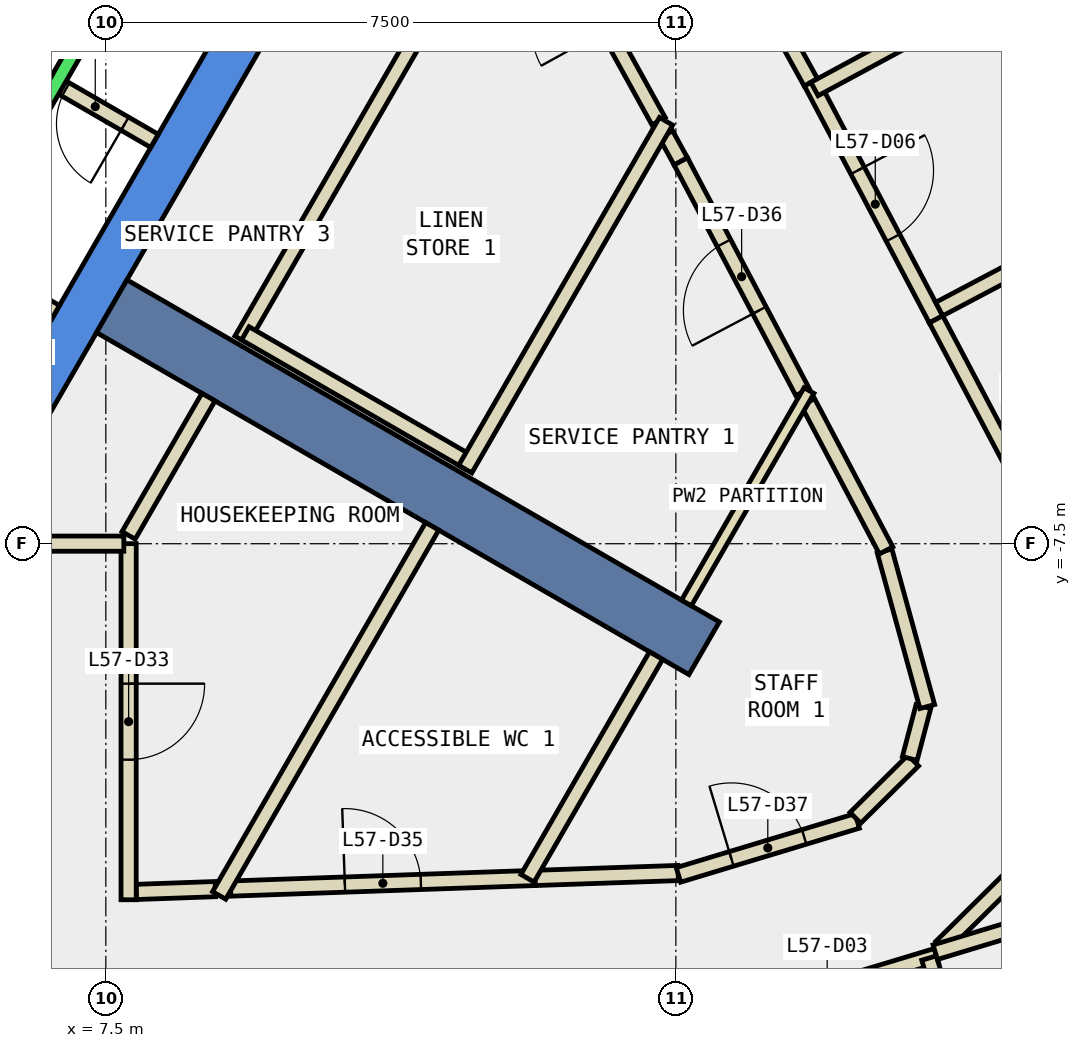
"""IFC4 building model, lengths in metres.
Left out: names, types, materials, properties, quantities, classifications, styles, units other than length and angle.
Written with IfcOpenShell. Run it as: python <this file> out.ifc"""

import sys

from ifc_helpers import new_model, si_unit, direction, frame, frame_2d, origin, place, context, subcontext, project, spatial, polyline, rectangle, outline, extrude, element, fill, save


model = new_model("IFC4")
c1 = context("Model", 3, precision=1e-05, world=origin(), true_north=direction((0.0, 1.0)))
c2 = subcontext(c1, "Body", "Model", "MODEL_VIEW")
j1 = project(units=[si_unit("LENGTHUNIT", "METRE"), si_unit("PLANEANGLEUNIT", "RADIAN")], contexts=[c1])
p1 = place(None, origin())
s1 = spatial("IfcSite", under=j1, at=p1, CompositionType="ELEMENT")
p2 = place(p1, origin())
s2 = spatial("IfcBuilding", under=s1, at=p2, CompositionType="ELEMENT")
p3 = place(p2, frame((0.0, 0.0, 252.2)))
s3 = spatial("IfcBuildingStorey", under=s2, at=p3, CompositionType="ELEMENT", Elevation=252.2)
p4 = place(p3, frame((0.0, 0.0, -0.34)))
e1 = element("IfcWall", 1, at=p4, inside=s3, PredefinedType="SHEAR", context=c2, shape_type="SweptSolid", body=[
    extrude(outline(polyline([(5.774, -7.5), (11.547, 2.5), (10.854, 2.5), (5.427, -6.9), (5.774, -7.5)])), origin(), (0.0, 0.0, 1.0), 3.6),
])
p5 = place(p3, frame((7.578, -4.375, -0.34), z_axis=(0.0, 0.0, 1.0), x_axis=(0.866024315419, -0.5000018851, 0.0)))
e2 = element("IfcWall", 2, at=p5, inside=s3, PredefinedType="SHEAR", context=c2, shape_type="SweptSolid", body=[
    extrude(rectangle(XDim=9.0, YDim=0.8, at=frame_2d((4.5, 0.0))), origin(), (0.0, 0.0, 1.0), 3.6),
])
p6 = place(p3, frame((7.9, -12.081, 0.0), z_axis=(0.0, 0.0, 1.0), x_axis=(0.999365240621, 0.035624652105, 0.0)))
e3 = element("IfcWall", 3, at=p6, inside=s3, PredefinedType="PARTITIONING", context=c2, shape_type="SweptSolid", body=[
    extrude(rectangle(XDim=1.042, YDim=0.2, at=frame_2d((0.521, 0.0))), origin(), (0.0, 0.0, 1.0), 3.26),
])
p7 = place(p3, frame((14.773, -1.941, 0.0), z_axis=(0.0, 0.0, 1.0), x_axis=(-0.483431586589, 0.875382145744, 0.0)))
e4 = element("IfcWall", 4, at=p7, inside=s3, PredefinedType="PARTITIONING", context=c2, shape_type="SweptSolid", body=[
    extrude(rectangle(XDim=3.771, YDim=0.2, at=frame_2d((1.885, 0.0))), origin(), (0.0, 0.0, 1.0), 3.26),
])
p8 = place(p7, frame((1.385, 0.0, 0.0)))
e5 = element("IfcOpeningElement", 5, at=p8, cuts=e4, PredefinedType="OPENING", context=c2, shape_type="SweptSolid", body=[
    extrude(rectangle(XDim=1.0, YDim=2.1, at=frame_2d((0.5, 1.05))), frame((0.0, 0.11, 0.0), z_axis=(0.0, -1.0, 0.0), x_axis=(1.0, 0.0, 0.0)), (0.0, 0.0, 1.0), 0.22),
])
p9 = place(p3, frame((9.141, -12.037, 0.0), z_axis=(0.0, 0.0, 1.0), x_axis=(0.999388955878, 0.034953038062, 0.0)))
e6 = element("IfcWall", 6, at=p9, inside=s3, PredefinedType="PARTITIONING", context=c2, shape_type="SweptSolid", body=[
    extrude(rectangle(XDim=4.009, YDim=0.2, at=frame_2d((2.005, 0.0))), origin(), (0.0, 0.0, 1.0), 3.26),
])
p10 = place(p9, frame((1.505, 0.0, 0.0)))
e7 = element("IfcOpeningElement", 7, at=p10, cuts=e6, PredefinedType="OPENING", context=c2, shape_type="SweptSolid", body=[
    extrude(rectangle(XDim=1.0, YDim=2.1, at=frame_2d((0.5, 1.05))), frame((0.0, 0.11, 0.0), z_axis=(0.0, -1.0, 0.0), x_axis=(1.0, 0.0, 0.0)), (0.0, 0.0, 1.0), 0.22),
])
p11 = place(p3, frame((16.667, -5.505, 0.0), z_axis=(0.0, 0.0, 1.0), x_axis=(-0.466812680399, 0.884356218624, 0.0)))
e8 = element("IfcWall", 8, at=p11, inside=s3, PredefinedType="PARTITIONING", context=c2, shape_type="SweptSolid", body=[
    extrude(rectangle(XDim=3.434, YDim=0.2, at=frame_2d((1.717, 0.0))), origin(), (0.0, 0.0, 1.0), 3.26),
])
p12 = place(p11, frame((1.217, 0.0, 0.0)))
e9 = element("IfcOpeningElement", 9, at=p12, cuts=e8, PredefinedType="OPENING", context=c2, shape_type="SweptSolid", body=[
    extrude(rectangle(XDim=1.0, YDim=2.1, at=frame_2d((0.5, 1.05))), frame((0.0, 0.11, 0.0), z_axis=(0.0, -1.0, 0.0), x_axis=(1.0, 0.0, 0.0)), (0.0, 0.0, 1.0), 0.22),
])
p13 = place(p3, frame((15.064, -2.468, 0.0), z_axis=(0.0, 0.0, 1.0), x_axis=(-0.482338449744, 0.875984942735, 0.0)))
e10 = element("IfcWall", 10, at=p13, inside=s3, PredefinedType="PARTITIONING", context=c2, shape_type="SweptSolid", body=[
    extrude(rectangle(XDim=0.402, YDim=0.2, at=frame_2d((0.201, 0.0))), origin(), (0.0, 0.0, 1.0), 3.26),
])
p14 = place(p3, frame((13.148, -11.897, 0.0), z_axis=(0.0, 0.0, 1.0), x_axis=(0.999405229262, 0.034484601243, 0.0)))
e11 = element("IfcWall", 11, at=p14, inside=s3, PredefinedType="PARTITIONING", context=c2, shape_type="SweptSolid", body=[
    extrude(rectangle(XDim=1.883, YDim=0.2, at=frame_2d((0.942, 0.0))), origin(), (0.0, 0.0, 1.0), 3.26),
])
p15 = place(p3, frame((15.034, -11.857, 0.0), z_axis=(0.0, 0.0, 1.0), x_axis=(0.957338084933, 0.288970225346, 0.0)))
e12 = element("IfcWall", 12, at=p15, inside=s3, PredefinedType="PARTITIONING", context=c2, shape_type="SweptSolid", body=[
    extrude(rectangle(XDim=2.457, YDim=0.2, at=frame_2d((1.229, 0.0))), origin(), (0.0, 0.0, 1.0), 3.26),
])
p16 = place(p15, frame((0.728, 0.0, 0.0)))
e13 = element("IfcOpeningElement", 13, at=p16, cuts=e12, PredefinedType="OPENING", context=c2, shape_type="SweptSolid", body=[
    extrude(rectangle(XDim=1.0, YDim=2.1, at=frame_2d((0.5, 1.05))), frame((0.0, 0.11, 0.0), z_axis=(0.0, -1.0, 0.0), x_axis=(1.0, 0.0, 0.0)), (0.0, 0.0, 1.0), 0.22),
])
p17 = place(p3, frame((17.362, -11.106, 0.0), z_axis=(0.0, 0.0, 1.0), x_axis=(0.710859741153, 0.703333795866, 0.0)))
e14 = element("IfcWall", 14, at=p17, inside=s3, PredefinedType="PARTITIONING", context=c2, shape_type="SweptSolid", body=[
    extrude(rectangle(XDim=1.071, YDim=0.2, at=frame_2d((0.535, 0.0))), origin(), (0.0, 0.0, 1.0), 3.26),
])
p18 = place(p3, frame((18.077, -10.326, 0.0), z_axis=(0.0, 0.0, 1.0), x_axis=(0.254782174857, 0.966998471237, 0.0)))
e15 = element("IfcWall", 15, at=p18, inside=s3, PredefinedType="PARTITIONING", context=c2, shape_type="SweptSolid", body=[
    extrude(rectangle(XDim=0.707, YDim=0.2, at=frame_2d((0.354, 0.0))), origin(), (0.0, 0.0, 1.0), 3.26),
])
p19 = place(p3, frame((18.308, -9.642, 0.0), z_axis=(0.0, 0.0, 1.0), x_axis=(-0.264859637197, 0.96428697626, 0.0)))
e16 = element("IfcWall", 16, at=p19, inside=s3, PredefinedType="PARTITIONING", context=c2, shape_type="SweptSolid", body=[
    extrude(rectangle(XDim=2.122, YDim=0.2, at=frame_2d((1.061, 0.0))), origin(), (0.0, 0.0, 1.0), 3.26),
])
p20 = place(p3, frame((17.766, -7.588, 0.0), z_axis=(0.0, 0.0, 1.0), x_axis=(-0.466727344864, 0.884401258228, 0.0)))
e17 = element("IfcWall", 17, at=p20, inside=s3, PredefinedType="PARTITIONING", context=c2, shape_type="SweptSolid", body=[
    extrude(rectangle(XDim=2.205, YDim=0.2, at=frame_2d((1.103, 0.0))), origin(), (0.0, 0.0, 1.0), 3.26),
])
p21 = place(p3, frame((18.427, -12.922, 0.0), z_axis=(0.0, 0.0, 1.0), x_axis=(-0.957336631432, -0.288975040651, 0.0)))
e18 = element("IfcWall", 18, at=p21, inside=s3, PredefinedType="PARTITIONING", context=c2, shape_type="SweptSolid", body=[
    extrude(rectangle(XDim=3.0, YDim=0.2, at=frame_2d((1.5, 0.0))), origin(), (0.0, 0.0, 1.0), 3.26),
])
p22 = place(p21, frame((1.0, 0.0, 0.0)))
e19 = element("IfcOpeningElement", 19, at=p22, cuts=e18, PredefinedType="OPENING", context=c2, shape_type="SweptSolid", body=[
    extrude(rectangle(XDim=1.0, YDim=2.1, at=frame_2d((0.5, 1.05))), frame((0.0, 0.11, 0.0), z_axis=(0.0, -1.0, 0.0), x_axis=(1.0, 0.0, 0.0)), (0.0, 0.0, 1.0), 0.22),
])
p23 = place(p3, frame((19.919, -11.39, 0.0), z_axis=(0.0, 0.0, 1.0), x_axis=(-0.71104667794, -0.70314480855, 0.0)))
e20 = element("IfcWall", 20, at=p23, inside=s3, PredefinedType="PARTITIONING", context=c2, shape_type="SweptSolid", body=[
    extrude(rectangle(XDim=2.008, YDim=0.2, at=frame_2d((1.004, 0.0))), origin(), (0.0, 0.0, 1.0), 3.26),
])
p24 = place(p3, frame((16.778, -1.429, 0.0), z_axis=(0.0, 0.0, 1.0), x_axis=(0.466493865945, -0.884524433261, 0.0)))
e21 = element("IfcWall", 21, at=p24, inside=s3, PredefinedType="PARTITIONING", context=c2, shape_type="SweptSolid", body=[
    extrude(rectangle(XDim=3.526, YDim=0.2, at=frame_2d((1.763, 0.0))), origin(), (0.0, 0.0, 1.0), 3.26),
])
p25 = place(p24, frame((1.313, 0.0, 0.0)))
e22 = element("IfcOpeningElement", 22, at=p25, cuts=e21, PredefinedType="OPENING", context=c2, shape_type="SweptSolid", body=[
    extrude(rectangle(XDim=1.0, YDim=2.1, at=frame_2d((0.5, 1.05))), frame((0.0, 0.11, 0.0), z_axis=(0.0, -1.0, 0.0), x_axis=(1.0, 0.0, 0.0)), (0.0, 0.0, 1.0), 0.22),
])
p26 = place(p3, frame((18.423, -4.548, 0.0), z_axis=(0.0, 0.0, 1.0), x_axis=(0.466792565793, -0.884366835946, 0.0)))
e23 = element("IfcWall", 23, at=p26, inside=s3, PredefinedType="PARTITIONING", context=c2, shape_type="SweptSolid", body=[
    extrude(rectangle(XDim=2.5, YDim=0.2, at=frame_2d((1.25, 0.0))), origin(), (0.0, 0.0, 1.0), 3.26),
])
p27 = place(p3, frame((15.715, 0.491, 0.0), z_axis=(0.0, 0.0, 1.0), x_axis=(0.483421428323, -0.875387755591, 0.0)))
e24 = element("IfcWall", 24, at=p27, inside=s3, PredefinedType="PARTITIONING", context=c2, shape_type="SweptSolid", body=[
    extrude(rectangle(XDim=2.194, YDim=0.2, at=frame_2d((1.097, 0.0))), origin(), (0.0, 0.0, 1.0), 3.26),
])
p28 = place(p3, frame((5.888, -3.902, 0.0), z_axis=(0.0, 0.0, 1.0), x_axis=(0.86621513555, -0.499671230855, 0.0)))
e25 = element("IfcWall", 25, at=p28, inside=s3, PredefinedType="PARTITIONING", context=c2, shape_type="SweptSolid", body=[
    extrude(rectangle(XDim=1.1, YDim=0.2, at=frame_2d((0.55, 0.0))), origin(), (0.0, 0.0, 1.0), 3.26),
])
p29 = place(p3, frame((8.14, -2.2, 0.0), z_axis=(0.0, 0.0, 1.0), x_axis=(-0.865545166185, 0.500830874941, 0.0)))
e26 = element("IfcWall", 26, at=p29, inside=s3, PredefinedType="PARTITIONING", context=c2, shape_type="SweptSolid", body=[
    extrude(rectangle(XDim=1.5, YDim=0.2, at=frame_2d((0.75, 0.0))), origin(), (0.0, 0.0, 1.0), 3.26),
])
p30 = place(p29, frame((0.45, 0.0, 0.0)))
e27 = element("IfcOpeningElement", 27, at=p30, cuts=e26, PredefinedType="OPENING", context=c2, shape_type="SweptSolid", body=[
    extrude(rectangle(XDim=0.9, YDim=2.1, at=frame_2d((0.45, 1.05))), frame((0.0, 0.11, 0.0), z_axis=(0.0, -1.0, 0.0), x_axis=(1.0, 0.0, 0.0)), (0.0, 0.0, 1.0), 0.22),
])
p31 = place(p3, frame((7.8, -7.39, 0.0), z_axis=(0.0, 0.0, 1.0), x_axis=(0.499977374825, 0.866038466041, 0.0)))
e28 = element("IfcWall", 28, at=p31, inside=s3, PredefinedType="PARTITIONING", context=c2, shape_type="SweptSolid", body=[
    extrude(rectangle(XDim=2.1, YDim=0.2, at=frame_2d((1.05, 0.0))), origin(), (0.0, 0.0, 1.0), 3.26),
])
p32 = place(p3, frame((9.285, -4.818, 0.0), z_axis=(0.0, 0.0, 1.0), x_axis=(0.499962569651, 0.866047013128, 0.0)))
e29 = element("IfcWall", 29, at=p32, inside=s3, PredefinedType="PARTITIONING", context=c2, shape_type="SweptSolid", body=[
    extrude(rectangle(XDim=7.334, YDim=0.2, at=frame_2d((3.667, 0.0))), origin(), (0.0, 0.0, 1.0), 3.26),
])
p33 = place(p3, frame((7.8, -7.499, 0.0), z_axis=(0.0, 0.0, 1.0), x_axis=(0.0, -1.0, 0.0)))
e30 = element("IfcWall", 30, at=p33, inside=s3, PredefinedType="PARTITIONING", context=c2, shape_type="SweptSolid", body=[
    extrude(rectangle(XDim=4.685, YDim=0.2, at=frame_2d((2.343, 0.0))), origin(), (0.0, 0.0, 1.0), 3.26),
])
p34 = place(p33, frame((1.842, 0.0, 0.0)))
e31 = element("IfcOpeningElement", 31, at=p34, cuts=e30, PredefinedType="OPENING", context=c2, shape_type="SweptSolid", body=[
    extrude(rectangle(XDim=1.0, YDim=2.1, at=frame_2d((0.5, 1.05))), frame((0.0, 0.11, 0.0), z_axis=(0.0, -1.0, 0.0), x_axis=(1.0, 0.0, 0.0)), (0.0, 0.0, 1.0), 0.22),
])
p35 = place(p3, frame((9.335, -4.732, 0.0), z_axis=(0.0, 0.0, 1.0), x_axis=(0.866002606077, -0.500039484709, 0.0)))
e32 = element("IfcWall", 32, at=p35, inside=s3, PredefinedType="PARTITIONING", context=c2, shape_type="SweptSolid", body=[
    extrude(rectangle(XDim=3.4, YDim=0.2, at=frame_2d((1.7, 0.0))), origin(), (0.0, 0.0, 1.0), 3.26),
])
p36 = place(p3, frame((11.794, -7.271, 0.0), z_axis=(0.0, 0.0, 1.0), x_axis=(-0.499918457185, -0.866072477433, 0.0)))
e33 = element("IfcWall", 33, at=p36, inside=s3, PredefinedType="PARTITIONING", context=c2, shape_type="SweptSolid", body=[
    extrude(rectangle(XDim=5.607, YDim=0.2, at=frame_2d((2.803, 0.0))), origin(), (0.0, 0.0, 1.0), 3.26),
])
p37 = place(p3, frame((14.871, -1.942, 0.0), z_axis=(0.0, 0.0, 1.0), x_axis=(-0.50000507839, -0.866022471755, 0.0)))
e34 = element("IfcWall", 34, at=p37, inside=s3, PredefinedType="PARTITIONING", context=c2, shape_type="SweptSolid", body=[
    extrude(rectangle(XDim=5.284, YDim=0.2, at=frame_2d((2.642, 0.0))), origin(), (0.0, 0.0, 1.0), 3.26),
])
p38 = place(p3, frame((14.739, -8.972, 0.0), z_axis=(0.0, 0.0, 1.0), x_axis=(-0.499974489635, -0.8660401317, 0.0)))
e35 = element("IfcWall", 35, at=p38, inside=s3, PredefinedType="PARTITIONING", context=c2, shape_type="SweptSolid", body=[
    extrude(rectangle(XDim=3.382, YDim=0.2, at=frame_2d((1.691, 0.0))), origin(), (0.0, 0.0, 1.0), 3.26),
])
p39 = place(p3, frame((16.752, -5.485, 0.0), z_axis=(0.0, 0.0, 1.0), x_axis=(-0.499988848364, -0.866031842089, 0.0)))
e36 = element("IfcWall", 36, at=p39, inside=s3, PredefinedType="PARTITIONING", context=c2, shape_type="SweptSolid", body=[
    extrude(rectangle(XDim=3.226, YDim=0.15, at=frame_2d((1.613, 0.0))), origin(), (0.0, 0.0, 1.0), 3.26),
])
p40 = place(p3, frame((18.331, -12.951, 0.0), z_axis=(0.0, 0.0, 1.0), x_axis=(0.289175152117, -0.957276204341, 0.0)))
e37 = element("IfcWall", 37, at=p40, inside=s3, PredefinedType="PARTITIONING", context=c2, shape_type="SweptSolid", body=[
    extrude(rectangle(XDim=2.5, YDim=0.2, at=frame_2d((1.25, 0.0))), origin(), (0.0, 0.0, 1.0), 3.26),
])
p41 = place(p3, frame((21.285, -12.007, 0.0), z_axis=(0.0, 0.0, 1.0), x_axis=(-0.957329834998, -0.288997555392, 0.0)))
e38 = element("IfcWall", 38, at=p41, inside=s3, PredefinedType="PARTITIONING", context=c2, shape_type="SweptSolid", body=[
    extrude(rectangle(XDim=3.0, YDim=0.2, at=frame_2d((1.5, 0.0))), origin(), (0.0, 0.0, 1.0), 3.26),
])
p42 = place(p3, frame((20.499, -3.339, 0.0), z_axis=(0.0, 0.0, 1.0), x_axis=(-0.884293452572, -0.466931568583, 0.0)))
e39 = element("IfcWall", 39, at=p42, inside=s3, PredefinedType="PARTITIONING", context=c2, shape_type="SweptSolid", body=[
    extrude(rectangle(XDim=2.3, YDim=0.2, at=frame_2d((1.15, 0.0))), origin(), (0.0, 0.0, 1.0), 3.26),
])
p43 = place(p3, frame((16.824, -1.518, 0.0), z_axis=(0.0, 0.0, 1.0), x_axis=(0.87996932648, 0.475030508972, 0.0)))
e40 = element("IfcWall", 40, at=p43, inside=s3, PredefinedType="PARTITIONING", context=c2, shape_type="SweptSolid", body=[
    extrude(rectangle(XDim=2.299, YDim=0.2, at=frame_2d((1.149, 0.0))), origin(), (0.0, 0.0, 1.0), 3.26),
])
p44 = place(p3, frame((5.944, -7.499, 0.0), z_axis=(0.0, 0.0, 1.0), x_axis=(1.0, 0.0, 0.0)))
e41 = element("IfcWall", 41, at=p44, inside=s3, PredefinedType="PARTITIONING", context=c2, shape_type="SweptSolid", body=[
    extrude(rectangle(XDim=1.793, YDim=0.2, at=frame_2d((0.896, 0.0))), origin(), (0.0, 0.0, 1.0), 3.26),
])
p45 = place(p3, frame((5.492, -3.788, 0.0), z_axis=(0.0, 0.0, 1.0), x_axis=(0.500034260056, 0.866005622828, 0.0)))
e42 = element("IfcWall", 42, at=p45, inside=s3, PredefinedType="STANDARD", context=c2, shape_type="SweptSolid", body=[
    extrude(rectangle(XDim=5.399, YDim=0.2, at=frame_2d((2.7, 0.0))), origin(), (0.0, 0.0, 1.0), 3.26),
])
p46 = place(p3, frame((4.677, -0.2, 0.0), z_axis=(0.0, 0.0, 1.0), x_axis=(0.865973769406, -0.500089422704, 0.0)))
e43 = element("IfcWall", 43, at=p46, inside=s3, PredefinedType="STANDARD", context=c2, shape_type="SweptSolid", body=[
    extrude(rectangle(XDim=2.399, YDim=0.2, at=frame_2d((1.2, 0.0))), origin(), (0.0, 0.0, 1.0), 3.26),
])
p47 = place(p25, origin())
e44 = element("IfcDoor", 44, at=p47, inside=s3, OperationType="SINGLE_SWING_RIGHT", PredefinedType="DOOR", context=c2, shape_type="SweptSolid", body=[
    extrude(rectangle(XDim=1.0, YDim=2.1, at=frame_2d((0.5, 1.05))), frame((0.0, 0.025, 0.0), z_axis=(0.0, -1.0, 0.0), x_axis=(1.0, 0.0, 0.0)), (0.0, 0.0, 1.0), 0.05),
])
fill(e22, e44)
p48 = place(p34, origin())
e45 = element("IfcDoor", 45, at=p48, inside=s3, OperationType="SINGLE_SWING_LEFT", PredefinedType="DOOR", context=c2, shape_type="SweptSolid", body=[
    extrude(rectangle(XDim=1.0, YDim=2.1, at=frame_2d((0.5, 1.05))), frame((0.0, 0.025, 0.0), z_axis=(0.0, -1.0, 0.0), x_axis=(1.0, 0.0, 0.0)), (0.0, 0.0, 1.0), 0.05),
])
fill(e31, e45)
p49 = place(p10, origin())
e46 = element("IfcDoor", 46, at=p49, inside=s3, OperationType="SINGLE_SWING_LEFT", PredefinedType="DOOR", context=c2, shape_type="SweptSolid", body=[
    extrude(rectangle(XDim=1.0, YDim=2.1, at=frame_2d((0.5, 1.05))), frame((0.0, 0.025, 0.0), z_axis=(0.0, -1.0, 0.0), x_axis=(1.0, 0.0, 0.0)), (0.0, 0.0, 1.0), 0.05),
])
fill(e7, e46)
p50 = place(p12, origin())
e47 = element("IfcDoor", 47, at=p50, inside=s3, OperationType="SINGLE_SWING_RIGHT", PredefinedType="DOOR", context=c2, shape_type="SweptSolid", body=[
    extrude(rectangle(XDim=1.0, YDim=2.1, at=frame_2d((0.5, 1.05))), frame((0.0, 0.025, 0.0), z_axis=(0.0, -1.0, 0.0), x_axis=(1.0, 0.0, 0.0)), (0.0, 0.0, 1.0), 0.05),
])
fill(e9, e47)
p51 = place(p16, origin())
e48 = element("IfcDoor", 48, at=p51, inside=s3, OperationType="SINGLE_SWING_LEFT", PredefinedType="DOOR", context=c2, shape_type="SweptSolid", body=[
    extrude(rectangle(XDim=1.0, YDim=2.1, at=frame_2d((0.5, 1.05))), frame((0.0, 0.025, 0.0), z_axis=(0.0, -1.0, 0.0), x_axis=(1.0, 0.0, 0.0)), (0.0, 0.0, 1.0), 0.05),
])
fill(e13, e48)
p52 = place(p30, origin())
e49 = element("IfcDoor", 49, at=p52, inside=s3, OperationType="SINGLE_SWING_LEFT", PredefinedType="DOOR", context=c2, shape_type="SweptSolid", body=[
    extrude(rectangle(XDim=0.9, YDim=2.1, at=frame_2d((0.45, 1.05))), frame((0.0, 0.025, 0.0), z_axis=(0.0, -1.0, 0.0), x_axis=(1.0, 0.0, 0.0)), (0.0, 0.0, 1.0), 0.05),
])
fill(e27, e49)
save(model, sys.argv[1])
